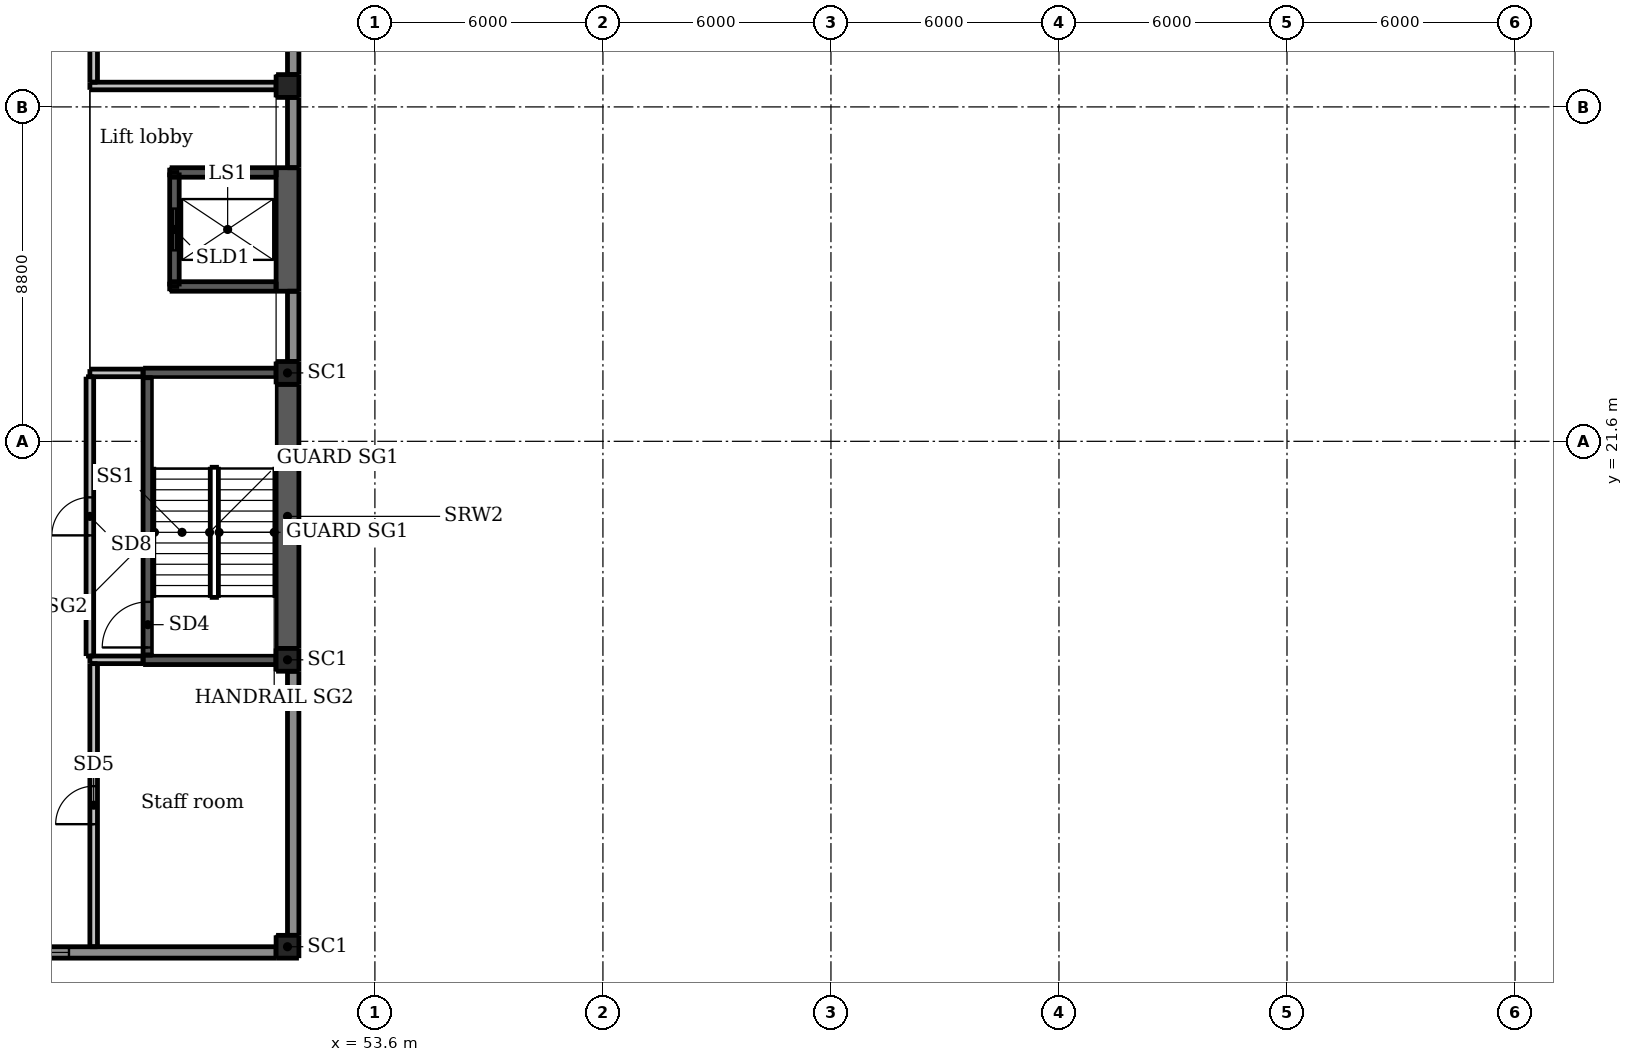
"""IFC4 building model, lengths in metres.
Left out: names, types, materials, properties, quantities, classifications, styles, units other than length and angle.
Written with IfcOpenShell. Run it as: python <this file> out.ifc"""

import sys

from ifc_helpers import new_model, si_unit, direction, frame, frame_2d, origin, origin_2d, place, context, subcontext, project, spatial, rectangle, extrude, element, fill, save


model = new_model("IFC4")
c1 = context("Model", 3, precision=1e-05, world=origin(), true_north=direction((0.0, 1.0)))
c2 = subcontext(c1, "Body", "Model", "MODEL_VIEW")
j1 = project(units=[si_unit("LENGTHUNIT", "METRE"), si_unit("PLANEANGLEUNIT", "RADIAN")], contexts=[c1])
p1 = place(None, origin())
s1 = spatial("IfcSite", under=j1, at=p1, CompositionType="ELEMENT")
p2 = place(p1, origin())
s2 = spatial("IfcBuilding", under=s1, at=p2, CompositionType="ELEMENT")
p3 = place(p2, frame((0.0, 0.0, 5.5)))
s3 = spatial("IfcBuildingStorey", under=s2, at=p3, CompositionType="ELEMENT", Elevation=5.5)
for number, where, z_axis, x_axis in (
    (1, (59.6, 20.6, 0.0), (0.0, 0.0, 1.0), (1.0, 0.0, 0.0)),
    (2, (65.6, 20.6, 0.0), (0.0, 0.0, 1.0), (1.0, 0.0, 0.0)),
    (3, (71.6, 20.6, 0.0), (0.0, 0.0, 1.0), (1.0, 0.0, 0.0)),
    (4, (77.6, 20.6, 0.0), (0.0, 0.0, 1.0), (1.0, 0.0, 0.0)),
    (5, (83.6, 20.6, 0.0), (0.0, 0.0, 1.0), (1.0, 0.0, 0.0)),
    (6, (52.6, 30.4, 0.0), (0.0, 0.0, 1.0), (1.0, 0.0, 0.0)),
):
    element("IfcColumn", number, at=place(p3, frame(where, z_axis=z_axis, x_axis=x_axis)), inside=s3, PredefinedType="COLUMN", context=c2, shape_type="SweptSolid", body=[
        extrude(rectangle(XDim=1.2, YDim=1.2, at=origin_2d()), origin(), (0.0, 0.0, 1.0), 4.2),
    ])
p4 = place(p3, frame((55.2, 23.2, 0.0), z_axis=(0.0, 0.0, 1.0), x_axis=(1.0, 0.0, 0.0)))
e7 = element("IfcColumn", 7, at=p4, inside=s3, PredefinedType="COLUMN", context=c2, shape_type="SweptSolid", body=[
    extrude(rectangle(XDim=3.2, YDim=3.2, at=origin_2d()), origin(), (0.0, 0.0, 1.0), 4.2),
])
for number, where, z_axis, x_axis in (
    (8, (51.3, 8.3, -0.3), (0.0, 0.0, 1.0), (1.0, 0.0, 0.0)),
    (9, (51.3, 15.85, -0.3), (0.0, 0.0, 1.0), (1.0, 0.0, 0.0)),
    (10, (51.3, 23.4, -0.3), (0.0, 0.0, 1.0), (1.0, 0.0, 0.0)),
    (11, (51.3, 30.95, -0.3), (0.0, 0.0, 1.0), (1.0, 0.0, 0.0)),
):
    element("IfcColumn", number, at=place(p3, frame(where, z_axis=z_axis, x_axis=x_axis)), inside=s3, PredefinedType="COLUMN", context=c2, shape_type="SweptSolid", body=[
        extrude(rectangle(XDim=0.6, YDim=0.6, at=origin_2d()), origin(), (0.0, 0.0, 1.0), 4.5),
    ])
p5 = place(p3, frame((47.625, 15.975, -0.3), z_axis=(0.0, 0.0, 1.0), x_axis=(0.0, 1.0, 0.0)))
e12 = element("IfcWall", 12, at=p5, inside=s3, PredefinedType="SHEAR", context=c2, shape_type="SweptSolid", body=[
    extrude(rectangle(XDim=7.3, YDim=0.25, at=frame_2d((3.65, 0.0))), origin(), (0.0, 0.0, 1.0), 4.5),
])
p6 = place(p5, frame((0.2, 0.0, 0.3)))
e13 = element("IfcOpeningElement", 13, at=p6, cuts=e12, PredefinedType="OPENING", context=c2, shape_type="SweptSolid", body=[
    extrude(rectangle(XDim=1.2, YDim=2.1, at=frame_2d((0.6, 1.05))), frame((0.0, 0.135, 0.0), z_axis=(0.0, -1.0, 0.0), x_axis=(1.0, 0.0, 0.0)), (0.0, 0.0, 1.0), 0.27),
])
for number, where, z_axis, x_axis in (
    (14, (47.5, 15.85, -0.3), (0.0, 0.0, 1.0), (1.0, 0.0, 0.0)),
    (15, (47.5, 23.4, -0.3), (0.0, 0.0, 1.0), (1.0, 0.0, 0.0)),
):
    element("IfcWall", number, at=place(p3, frame(where, z_axis=z_axis, x_axis=x_axis)), inside=s3, PredefinedType="SHEAR", context=c2, shape_type="SweptSolid", body=[
        extrude(rectangle(XDim=3.5, YDim=0.25, at=frame_2d((1.75, 0.0))), origin(), (0.0, 0.0, 1.0), 4.5),
    ])
p7 = place(p3, frame((51.3, 16.15, -0.3), z_axis=(0.0, 0.0, 1.0), x_axis=(0.0, 1.0, 0.0)))
e16 = element("IfcWall", 16, at=p7, inside=s3, PredefinedType="SHEAR", context=c2, shape_type="SweptSolid", body=[
    extrude(rectangle(XDim=6.95, YDim=0.6, at=frame_2d((3.475, 0.0))), origin(), (0.0, 0.0, 1.0), 4.5),
])
p8 = place(p3, frame((48.325, 25.675, -0.3), z_axis=(0.0, 0.0, 1.0), x_axis=(0.0, 1.0, 0.0)))
e17 = element("IfcWall", 17, at=p8, inside=s3, PredefinedType="SHEAR", context=c2, shape_type="SweptSolid", body=[
    extrude(rectangle(XDim=3.0, YDim=0.25, at=frame_2d((1.5, 0.0))), origin(), (0.0, 0.0, 1.0), 4.5),
])
p9 = place(p8, frame((0.95, 0.0, 0.3)))
e18 = element("IfcOpeningElement", 18, at=p9, cuts=e17, PredefinedType="OPENING", context=c2, shape_type="SweptSolid", body=[
    extrude(rectangle(XDim=1.1, YDim=2.1, at=frame_2d((0.55, 1.05))), frame((0.0, 0.135, 0.0), z_axis=(0.0, -1.0, 0.0), x_axis=(1.0, 0.0, 0.0)), (0.0, 0.0, 1.0), 0.27),
])
for number, where, z_axis, x_axis in (
    (19, (48.2, 25.675, -0.3), (0.0, 0.0, 1.0), (1.0, 0.0, 0.0)),
    (20, (48.2, 28.675, -0.3), (0.0, 0.0, 1.0), (1.0, 0.0, 0.0)),
):
    element("IfcWall", number, at=place(p3, frame(where, z_axis=z_axis, x_axis=x_axis)), inside=s3, PredefinedType="SHEAR", context=c2, shape_type="SweptSolid", body=[
        extrude(rectangle(XDim=2.8, YDim=0.25, at=frame_2d((1.4, 0.0))), origin(), (0.0, 0.0, 1.0), 4.5),
    ])
p10 = place(p3, frame((51.3, 25.55, -0.3), z_axis=(0.0, 0.0, 1.0), x_axis=(0.0, 1.0, 0.0)))
e21 = element("IfcWall", 21, at=p10, inside=s3, PredefinedType="SHEAR", context=c2, shape_type="SweptSolid", body=[
    extrude(rectangle(XDim=3.25, YDim=0.6, at=frame_2d((1.625, 0.0))), origin(), (0.0, 0.0, 1.0), 4.5),
])
p11 = place(p3, frame((52.125, 20.0, 0.0), z_axis=(0.0, 0.0, 1.0), x_axis=(0.0, 1.0, 0.0)))
e22 = element("IfcWall", 22, at=p11, inside=s3, PredefinedType="SOLIDWALL", context=c2, shape_type="SweptSolid", body=[
    extrude(rectangle(XDim=9.8, YDim=0.25, at=frame_2d((4.9, 0.0))), origin(), (0.0, 0.0, 1.0), 4.2),
])
p12 = place(p3, frame((52.125, 31.0, 0.0), z_axis=(0.0, 0.0, 1.0), x_axis=(0.0, 1.0, 0.0)))
e23 = element("IfcWall", 23, at=p12, inside=s3, PredefinedType="SOLIDWALL", context=c2, shape_type="SweptSolid", body=[
    extrude(rectangle(XDim=4.8, YDim=0.25, at=frame_2d((2.4, 0.0))), origin(), (0.0, 0.0, 1.0), 4.2),
])
p13 = place(p3, frame((36.2, 8.15, 0.0), z_axis=(0.0, 0.0, 1.0), x_axis=(1.0, 0.0, 0.0)))
e24 = element("IfcWall", 24, at=p13, inside=s3, PredefinedType="SOLIDWALL", context=c2, shape_type="SweptSolid", body=[
    extrude(rectangle(XDim=14.8, YDim=0.3, at=frame_2d((7.4, 0.0))), origin(), (0.0, 0.0, 1.0), 3.1),
])
p14 = place(p13, frame((7.85, 0.0, 0.9)))
e25 = element("IfcOpeningElement", 25, at=p14, cuts=e24, PredefinedType="OPENING", context=c2, shape_type="SweptSolid", body=[
    extrude(rectangle(XDim=1.5, YDim=1.5, at=frame_2d((0.75, 0.75))), frame((0.0, 0.16, 0.0), z_axis=(0.0, -1.0, 0.0), x_axis=(1.0, 0.0, 0.0)), (0.0, 0.0, 1.0), 0.32),
])
for number, where, z_axis, x_axis in (
    (26, (51.45, 8.6, 0.0), (0.0, 0.0, 1.0), (0.0, 1.0, 0.0)),
    (27, (51.45, 31.25, 0.0), (0.0, 0.0, 1.0), (0.0, 1.0, 0.0)),
):
    element("IfcWall", number, at=place(p3, frame(where, z_axis=z_axis, x_axis=x_axis)), inside=s3, PredefinedType="SOLIDWALL", context=c2, shape_type="SweptSolid", body=[
        extrude(rectangle(XDim=6.95, YDim=0.3, at=frame_2d((3.475, 0.0))), origin(), (0.0, 0.0, 1.0), 3.3),
    ])
p15 = place(p3, frame((51.45, 23.7, 0.0), z_axis=(0.0, 0.0, 1.0), x_axis=(0.0, 1.0, 0.0)))
e28 = element("IfcWall", 28, at=p15, inside=s3, PredefinedType="SOLIDWALL", context=c2, shape_type="SweptSolid", body=[
    extrude(rectangle(XDim=1.85, YDim=0.3, at=frame_2d((0.925, 0.0))), origin(), (0.0, 0.0, 1.0), 3.3),
])
p16 = place(p3, frame((51.45, 28.8, 0.0), z_axis=(0.0, 0.0, 1.0), x_axis=(0.0, 1.0, 0.0)))
e29 = element("IfcWall", 29, at=p16, inside=s3, PredefinedType="SOLIDWALL", context=c2, shape_type="SweptSolid", body=[
    extrude(rectangle(XDim=1.85, YDim=0.3, at=frame_2d((0.925, 0.0))), origin(), (0.0, 0.0, 1.0), 3.3),
])
p17 = place(p3, frame((53.2, 30.4, 0.0), z_axis=(0.0, 0.0, 1.0), x_axis=(1.0, 0.0, 0.0)))
e30 = element("IfcWall", 30, at=p17, inside=s3, PredefinedType="PARTITIONING", context=c2, shape_type="SweptSolid", body=[
    extrude(rectangle(XDim=6.28, YDim=0.15, at=frame_2d((3.14, 0.0))), origin(), (0.0, 0.0, 1.0), 3.797),
])
p18 = place(p3, frame((59.495, 30.4, 0.0), z_axis=(0.0, 0.0, 1.0), x_axis=(1.0, 0.0, 0.0)))
e31 = element("IfcWall", 31, at=p18, inside=s3, PredefinedType="PARTITIONING", context=c2, shape_type="SweptSolid", body=[
    extrude(rectangle(XDim=0.211, YDim=0.15, at=frame_2d((0.105, 0.0))), origin(), (0.0, 0.0, 1.0), 3.66),
])
p19 = place(p3, frame((59.705, 30.4, 0.0), z_axis=(0.0, 0.0, 1.0), x_axis=(1.0, 0.0, 0.0)))
e32 = element("IfcWall", 32, at=p19, inside=s3, PredefinedType="PARTITIONING", context=c2, shape_type="SweptSolid", body=[
    extrude(rectangle(XDim=5.789, YDim=0.15, at=frame_2d((2.895, 0.0))), origin(), (0.0, 0.0, 1.0), 4.2),
])
p20 = place(p19, frame((1.995, 0.0, 0.0)))
e33 = element("IfcOpeningElement", 33, at=p20, cuts=e32, PredefinedType="OPENING", context=c2, shape_type="SweptSolid", body=[
    extrude(rectangle(XDim=1.8, YDim=2.1, at=frame_2d((0.9, 1.05))), frame((0.0, 0.085, 0.0), z_axis=(0.0, -1.0, 0.0), x_axis=(1.0, 0.0, 0.0)), (0.0, 0.0, 1.0), 0.17),
])
p21 = place(p3, frame((65.495, 30.4, 0.0), z_axis=(0.0, 0.0, 1.0), x_axis=(1.0, 0.0, 0.0)))
e34 = element("IfcWall", 34, at=p21, inside=s3, PredefinedType="PARTITIONING", context=c2, shape_type="SweptSolid", body=[
    extrude(rectangle(XDim=0.211, YDim=0.15, at=frame_2d((0.105, 0.0))), origin(), (0.0, 0.0, 1.0), 3.66),
])
p22 = place(p3, frame((65.705, 30.4, 0.0), z_axis=(0.0, 0.0, 1.0), x_axis=(1.0, 0.0, 0.0)))
e35 = element("IfcWall", 35, at=p22, inside=s3, PredefinedType="PARTITIONING", context=c2, shape_type="SweptSolid", body=[
    extrude(rectangle(XDim=5.789, YDim=0.15, at=frame_2d((2.895, 0.0))), origin(), (0.0, 0.0, 1.0), 4.2),
])
p23 = place(p3, frame((71.495, 30.4, 0.0), z_axis=(0.0, 0.0, 1.0), x_axis=(1.0, 0.0, 0.0)))
e36 = element("IfcWall", 36, at=p23, inside=s3, PredefinedType="PARTITIONING", context=c2, shape_type="SweptSolid", body=[
    extrude(rectangle(XDim=0.211, YDim=0.15, at=frame_2d((0.105, 0.0))), origin(), (0.0, 0.0, 1.0), 3.66),
])
p24 = place(p3, frame((71.705, 30.4, 0.0), z_axis=(0.0, 0.0, 1.0), x_axis=(1.0, 0.0, 0.0)))
e37 = element("IfcWall", 37, at=p24, inside=s3, PredefinedType="PARTITIONING", context=c2, shape_type="SweptSolid", body=[
    extrude(rectangle(XDim=5.789, YDim=0.15, at=frame_2d((2.895, 0.0))), origin(), (0.0, 0.0, 1.0), 4.2),
])
p25 = place(p24, frame((0.245, 0.0, 0.0)))
e38 = element("IfcOpeningElement", 38, at=p25, cuts=e37, PredefinedType="OPENING", context=c2, shape_type="SweptSolid", body=[
    extrude(rectangle(XDim=1.8, YDim=2.1, at=frame_2d((0.9, 1.05))), frame((0.0, 0.085, 0.0), z_axis=(0.0, -1.0, 0.0), x_axis=(1.0, 0.0, 0.0)), (0.0, 0.0, 1.0), 0.17),
])
p26 = place(p3, frame((77.495, 30.4, 0.0), z_axis=(0.0, 0.0, 1.0), x_axis=(1.0, 0.0, 0.0)))
e39 = element("IfcWall", 39, at=p26, inside=s3, PredefinedType="PARTITIONING", context=c2, shape_type="SweptSolid", body=[
    extrude(rectangle(XDim=0.211, YDim=0.15, at=frame_2d((0.105, 0.0))), origin(), (0.0, 0.0, 1.0), 3.66),
])
p27 = place(p3, frame((77.705, 30.4, 0.0), z_axis=(0.0, 0.0, 1.0), x_axis=(1.0, 0.0, 0.0)))
e40 = element("IfcWall", 40, at=p27, inside=s3, PredefinedType="PARTITIONING", context=c2, shape_type="SweptSolid", body=[
    extrude(rectangle(XDim=5.789, YDim=0.15, at=frame_2d((2.895, 0.0))), origin(), (0.0, 0.0, 1.0), 4.2),
])
p28 = place(p27, frame((1.995, 0.0, 0.0)))
e41 = element("IfcOpeningElement", 41, at=p28, cuts=e40, PredefinedType="OPENING", context=c2, shape_type="SweptSolid", body=[
    extrude(rectangle(XDim=1.8, YDim=2.1, at=frame_2d((0.9, 1.05))), frame((0.0, 0.085, 0.0), z_axis=(0.0, -1.0, 0.0), x_axis=(1.0, 0.0, 0.0)), (0.0, 0.0, 1.0), 0.17),
])
p29 = place(p3, frame((83.495, 30.4, 0.0), z_axis=(0.0, 0.0, 1.0), x_axis=(1.0, 0.0, 0.0)))
e42 = element("IfcWall", 42, at=p29, inside=s3, PredefinedType="PARTITIONING", context=c2, shape_type="SweptSolid", body=[
    extrude(rectangle(XDim=0.211, YDim=0.15, at=frame_2d((0.105, 0.0))), origin(), (0.0, 0.0, 1.0), 3.66),
])
p30 = place(p3, frame((83.705, 30.4, 0.0), z_axis=(0.0, 0.0, 1.0), x_axis=(1.0, 0.0, 0.0)))
e43 = element("IfcWall", 43, at=p30, inside=s3, PredefinedType="PARTITIONING", context=c2, shape_type="SweptSolid", body=[
    extrude(rectangle(XDim=5.789, YDim=0.15, at=frame_2d((2.895, 0.0))), origin(), (0.0, 0.0, 1.0), 4.2),
])
p31 = place(p3, frame((59.6, 30.475, 0.0), z_axis=(0.0, 0.0, 1.0), x_axis=(0.0, 1.0, 0.0)))
e44 = element("IfcWall", 44, at=p31, inside=s3, PredefinedType="PARTITIONING", context=c2, shape_type="SweptSolid", body=[
    extrude(rectangle(XDim=5.82, YDim=0.15, at=frame_2d((2.91, 0.0))), origin(), (0.0, 0.0, 1.0), 3.66),
])
for number, where, z_axis, x_axis in (
    (45, (65.6, 21.2, 0.0), (0.0, 0.0, 1.0), (0.0, 1.0, 0.0)),
    (46, (77.6, 21.2, 0.0), (0.0, 0.0, 1.0), (0.0, 1.0, 0.0)),
    (47, (83.6, 21.2, 0.0), (0.0, 0.0, 1.0), (0.0, 1.0, 0.0)),
):
    element("IfcWall", number, at=place(p3, frame(where, z_axis=z_axis, x_axis=x_axis)), inside=s3, PredefinedType="PARTITIONING", context=c2, shape_type="SweptSolid", body=[
        extrude(rectangle(XDim=9.125, YDim=0.1, at=frame_2d((4.562, 0.0))), origin(), (0.0, 0.0, 1.0), 3.66),
    ])
p32 = place(p3, frame((46.2, 8.3, 0.0), z_axis=(0.0, 0.0, 1.0), x_axis=(0.0, 1.0, 0.0)))
e48 = element("IfcWall", 48, at=p32, inside=s3, PredefinedType="PARTITIONING", context=c2, shape_type="SweptSolid", body=[
    extrude(rectangle(XDim=7.45, YDim=0.2, at=frame_2d((3.725, 0.0))), origin(), (0.0, 0.0, 1.0), 3.1),
])
p33 = place(p32, frame((3.225, 0.0, 0.0)))
e49 = element("IfcOpeningElement", 49, at=p33, cuts=e48, PredefinedType="OPENING", context=c2, shape_type="SweptSolid", body=[
    extrude(rectangle(XDim=1.0, YDim=2.1, at=frame_2d((0.5, 1.05))), frame((0.0, 0.11, 0.0), z_axis=(0.0, -1.0, 0.0), x_axis=(1.0, 0.0, 0.0)), (0.0, 0.0, 1.0), 0.22),
])
p34 = place(p3, frame((46.2, 31.05, 0.0), z_axis=(0.0, 0.0, 1.0), x_axis=(0.0, 1.0, 0.0)))
e50 = element("IfcWall", 50, at=p34, inside=s3, PredefinedType="PARTITIONING", context=c2, shape_type="SweptSolid", body=[
    extrude(rectangle(XDim=7.35, YDim=0.2, at=frame_2d((3.675, 0.0))), origin(), (0.0, 0.0, 1.0), 3.1),
])
p35 = place(p34, frame((3.225, 0.0, 0.0)))
e51 = element("IfcOpeningElement", 51, at=p35, cuts=e50, PredefinedType="OPENING", context=c2, shape_type="SweptSolid", body=[
    extrude(rectangle(XDim=0.9, YDim=2.1, at=frame_2d((0.45, 1.05))), frame((0.0, 0.11, 0.0), z_axis=(0.0, -1.0, 0.0), x_axis=(1.0, 0.0, 0.0)), (0.0, 0.0, 1.0), 0.22),
])
for number, where, z_axis, x_axis in (
    (52, (46.1, 15.85, 0.0), (0.0, 0.0, 1.0), (1.0, 0.0, 0.0)),
    (53, (46.1, 23.4, 0.0), (0.0, 0.0, 1.0), (1.0, 0.0, 0.0)),
):
    element("IfcWall", number, at=place(p3, frame(where, z_axis=z_axis, x_axis=x_axis)), inside=s3, PredefinedType="PARTITIONING", context=c2, shape_type="SweptSolid", body=[
        extrude(rectangle(XDim=1.4, YDim=0.2, at=frame_2d((0.7, 0.0))), origin(), (0.0, 0.0, 1.0), 3.1),
    ])
p36 = place(p3, frame((46.1, 30.95, 0.0), z_axis=(0.0, 0.0, 1.0), x_axis=(1.0, 0.0, 0.0)))
e54 = element("IfcWall", 54, at=p36, inside=s3, PredefinedType="PARTITIONING", context=c2, shape_type="SweptSolid", body=[
    extrude(rectangle(XDim=4.9, YDim=0.2, at=frame_2d((2.45, 0.0))), origin(), (0.0, 0.0, 1.0), 3.1),
])
p37 = place(p3, frame((46.1, 15.95, 0.0), z_axis=(0.0, 0.0, 1.0), x_axis=(0.0, 1.0, 0.0)))
e55 = element("IfcWall", 55, at=p37, inside=s3, PredefinedType="PARTITIONING", context=c2, shape_type="SweptSolid", body=[
    extrude(rectangle(XDim=7.35, YDim=0.2, at=frame_2d((3.675, 0.0))), origin(), (0.0, 0.0, 1.0), 3.1),
])
p38 = place(p37, frame((3.175, 0.0, 0.0)))
e56 = element("IfcOpeningElement", 56, at=p38, cuts=e55, PredefinedType="OPENING", context=c2, shape_type="SweptSolid", body=[
    extrude(rectangle(XDim=1.0, YDim=2.1, at=frame_2d((0.5, 1.05))), frame((0.0, 0.11, 0.0), z_axis=(0.0, -1.0, 0.0), x_axis=(1.0, 0.0, 0.0)), (0.0, 0.0, 1.0), 0.22),
])
p39 = place(p14, origin())
e57 = element("IfcWindow", 57, at=p39, inside=s3, PartitioningType="DOUBLE_PANEL_HORIZONTAL", PredefinedType="WINDOW", context=c2, shape_type="SweptSolid", body=[
    extrude(rectangle(XDim=1.5, YDim=1.5, at=frame_2d((0.75, 0.75))), frame((0.0, 0.03, 0.0), z_axis=(0.0, -1.0, 0.0), x_axis=(1.0, 0.0, 0.0)), (0.0, 0.0, 1.0), 0.06),
])
fill(e25, e57)
p40 = place(p20, origin())
e58 = element("IfcDoor", 58, at=p40, inside=s3, OperationType="DOUBLE_DOOR_SINGLE_SWING", PredefinedType="DOOR", context=c2, shape_type="SweptSolid", body=[
    extrude(rectangle(XDim=1.8, YDim=2.1, at=frame_2d((0.9, 1.05))), frame((0.0, 0.025, 0.0), z_axis=(0.0, -1.0, 0.0), x_axis=(1.0, 0.0, 0.0)), (0.0, 0.0, 1.0), 0.05),
])
fill(e33, e58)
p41 = place(p25, origin())
e59 = element("IfcDoor", 59, at=p41, inside=s3, OperationType="DOUBLE_DOOR_SINGLE_SWING", PredefinedType="DOOR", context=c2, shape_type="SweptSolid", body=[
    extrude(rectangle(XDim=1.8, YDim=2.1, at=frame_2d((0.9, 1.05))), frame((0.0, 0.025, 0.0), z_axis=(0.0, -1.0, 0.0), x_axis=(1.0, 0.0, 0.0)), (0.0, 0.0, 1.0), 0.05),
])
fill(e38, e59)
p42 = place(p28, origin())
e60 = element("IfcDoor", 60, at=p42, inside=s3, OperationType="DOUBLE_DOOR_SINGLE_SWING", PredefinedType="DOOR", context=c2, shape_type="SweptSolid", body=[
    extrude(rectangle(XDim=1.8, YDim=2.1, at=frame_2d((0.9, 1.05))), frame((0.0, 0.025, 0.0), z_axis=(0.0, -1.0, 0.0), x_axis=(1.0, 0.0, 0.0)), (0.0, 0.0, 1.0), 0.05),
])
fill(e41, e60)
p43 = place(p33, origin())
e61 = element("IfcDoor", 61, at=p43, inside=s3, OperationType="SINGLE_SWING_LEFT", PredefinedType="DOOR", context=c2, shape_type="SweptSolid", body=[
    extrude(rectangle(XDim=1.0, YDim=2.1, at=frame_2d((0.5, 1.05))), frame((0.0, 0.025, 0.0), z_axis=(0.0, -1.0, 0.0), x_axis=(1.0, 0.0, 0.0)), (0.0, 0.0, 1.0), 0.05),
])
fill(e49, e61)
p44 = place(p38, origin())
e62 = element("IfcDoor", 62, at=p44, inside=s3, OperationType="SINGLE_SWING_LEFT", PredefinedType="DOOR", context=c2, shape_type="SweptSolid", body=[
    extrude(rectangle(XDim=1.0, YDim=2.1, at=frame_2d((0.5, 1.05))), frame((0.0, 0.025, 0.0), z_axis=(0.0, -1.0, 0.0), x_axis=(1.0, 0.0, 0.0)), (0.0, 0.0, 1.0), 0.05),
])
fill(e56, e62)
p45 = place(p6, origin())
e63 = element("IfcDoor", 63, at=p45, inside=s3, OperationType="SINGLE_SWING_LEFT", PredefinedType="DOOR", context=c2, shape_type="SweptSolid", body=[
    extrude(rectangle(XDim=1.2, YDim=2.1, at=frame_2d((0.6, 1.05))), frame((0.0, 0.025, 0.0), z_axis=(0.0, -1.0, 0.0), x_axis=(1.0, 0.0, 0.0)), (0.0, 0.0, 1.0), 0.05),
])
fill(e13, e63)
p46 = place(p9, origin())
e64 = element("IfcDoor", 64, at=p46, inside=s3, OperationType="SLIDING_TO_LEFT", PredefinedType="DOOR", context=c2, shape_type="SweptSolid", body=[
    extrude(rectangle(XDim=1.1, YDim=2.1, at=frame_2d((0.55, 1.05))), frame((0.0, 0.025, 0.0), z_axis=(0.0, -1.0, 0.0), x_axis=(1.0, 0.0, 0.0)), (0.0, 0.0, 1.0), 0.05),
])
fill(e18, e64)
save(model, sys.argv[1])
